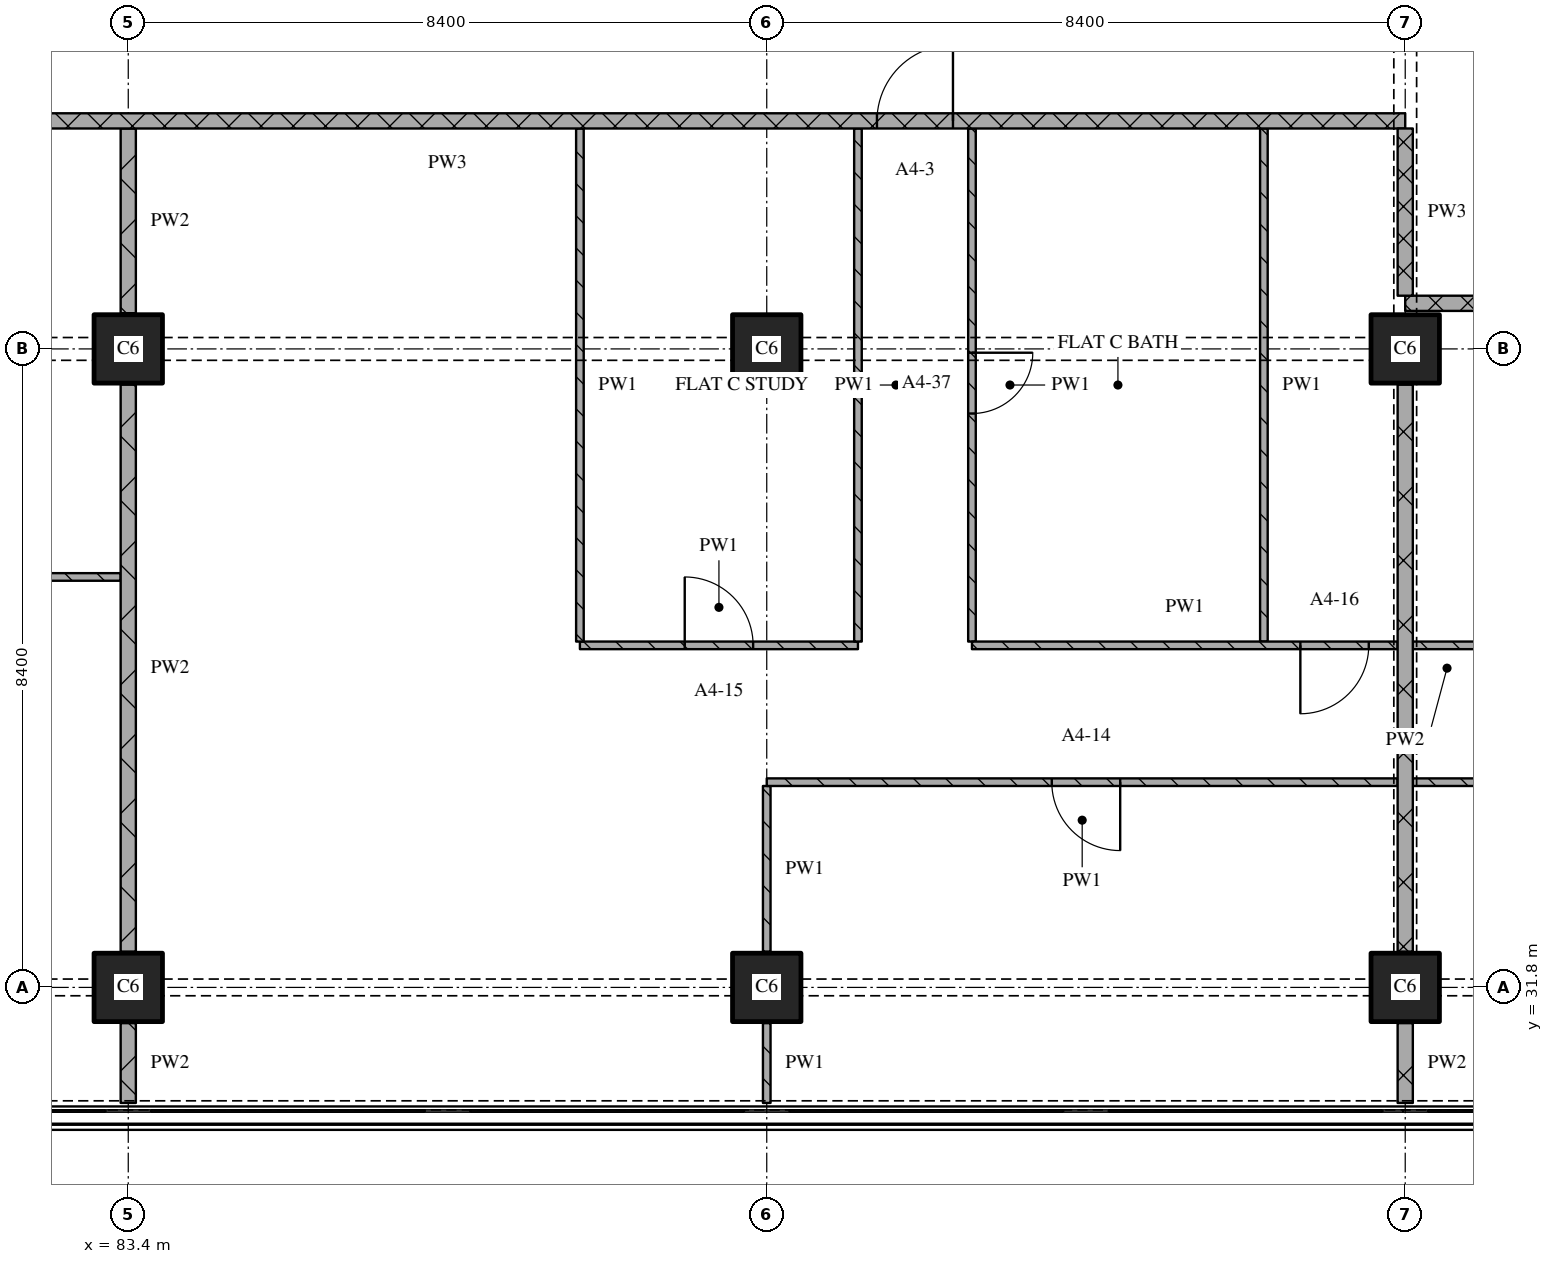
"""IFC4 building model, lengths in metres.
Left out: names, types, materials, properties, quantities, classifications, styles, units other than length and angle.
Written with IfcOpenShell. Run it as: python <this file> out.ifc"""

import sys

from ifc_helpers import new_model, si_unit, direction, frame, frame_2d, origin, origin_2d, place, context, subcontext, project, spatial, rectangle, extrude, element, fill, save


model = new_model("IFC4")
c1 = context("Model", 3, precision=1e-05, world=origin(), true_north=direction((0.0, 1.0)))
c2 = subcontext(c1, "Body", "Model", "MODEL_VIEW")
j1 = project(units=[si_unit("LENGTHUNIT", "METRE"), si_unit("PLANEANGLEUNIT", "RADIAN")], contexts=[c1])
p1 = place(None, origin())
s1 = spatial("IfcSite", under=j1, at=p1, CompositionType="ELEMENT")
p2 = place(p1, origin())
s2 = spatial("IfcBuilding", under=s1, at=p2, CompositionType="ELEMENT")
p3 = place(p2, frame((0.0, 0.0, 69.6)))
s3 = spatial("IfcBuildingStorey", under=s2, at=p3, CompositionType="ELEMENT", Elevation=69.6)
for number, where, z_axis, x_axis in (
    (1, (83.4, 31.8, 0.0), (0.0, 0.0, 1.0), (1.0, 0.0, 0.0)),
    (2, (83.4, 40.2, 0.0), (0.0, 0.0, 1.0), (1.0, 0.0, 0.0)),
    (3, (91.8, 31.8, 0.0), (0.0, 0.0, 1.0), (1.0, 0.0, 0.0)),
    (4, (91.8, 40.2, 0.0), (0.0, 0.0, 1.0), (1.0, 0.0, 0.0)),
    (5, (100.2, 31.8, 0.0), (0.0, 0.0, 1.0), (1.0, 0.0, 0.0)),
    (6, (100.2, 40.2, 0.0), (0.0, 0.0, 1.0), (1.0, 0.0, 0.0)),
):
    element("IfcColumn", number, at=place(p3, frame(where, z_axis=z_axis, x_axis=x_axis)), inside=s3, PredefinedType="COLUMN", context=c2, shape_type="SweptSolid", body=[
        extrude(rectangle(XDim=0.9, YDim=0.9, at=origin_2d()), origin(), (0.0, 0.0, 1.0), 3.6),
    ])
p4 = place(p3, frame((89.342, 36.3, 0.0), z_axis=(0.0, 0.0, 1.0), x_axis=(1.0, 0.0, 0.0)))
e7 = element("IfcWall", 7, at=p4, inside=s3, PredefinedType="PARTITIONING", context=c2, shape_type="SweptSolid", body=[
    extrude(rectangle(XDim=3.658, YDim=0.1, at=frame_2d((1.829, 0.0))), origin(), (0.0, 0.0, 1.0), 3.32),
])
p5 = place(p4, frame((1.379, 0.0, 0.0)))
e8 = element("IfcOpeningElement", 8, at=p5, cuts=e7, PredefinedType="OPENING", context=c2, shape_type="SweptSolid", body=[
    extrude(rectangle(XDim=0.9, YDim=2.1, at=frame_2d((0.45, 1.05))), frame((0.0, 0.06, 0.0), z_axis=(0.0, -1.0, 0.0), x_axis=(1.0, 0.0, 0.0)), (0.0, 0.0, 1.0), 0.12),
])
p6 = place(p3, frame((83.3, 37.2, 0.0), z_axis=(0.0, 0.0, 1.0), x_axis=(-1.0, 0.0, 0.0)))
e9 = element("IfcWall", 9, at=p6, inside=s3, PredefinedType="PARTITIONING", context=c2, shape_type="SweptSolid", body=[
    extrude(rectangle(XDim=4.1, YDim=0.1, at=frame_2d((2.05, 0.0))), origin(), (0.0, 0.0, 1.0), 3.32),
])
p7 = place(p6, frame((1.55, 0.0, 0.0)))
e10 = element("IfcOpeningElement", 10, at=p7, cuts=e9, PredefinedType="OPENING", context=c2, shape_type="SweptSolid", body=[
    extrude(rectangle(XDim=0.9, YDim=2.1, at=frame_2d((0.45, 1.05))), frame((0.0, 0.06, 0.0), z_axis=(0.0, -1.0, 0.0), x_axis=(1.0, 0.0, 0.0)), (0.0, 0.0, 1.0), 0.12),
])
p8 = place(p3, frame((124.28, 40.8, 0.0), z_axis=(0.0, 0.0, 1.0), x_axis=(-1.0, 0.0, 0.0)))
e11 = element("IfcWall", 11, at=p8, inside=s3, PredefinedType="PARTITIONING", context=c2, shape_type="SweptSolid", body=[
    extrude(rectangle(XDim=24.08, YDim=0.2, at=frame_2d((12.04, 0.0))), origin(), (0.0, 0.0, 1.0), 3.32),
])
p9 = place(p8, frame((12.03, 0.0, 0.0)))
e12 = element("IfcOpeningElement", 12, at=p9, cuts=e11, PredefinedType="OPENING", context=c2, shape_type="SweptSolid", body=[
    extrude(rectangle(XDim=1.0, YDim=2.1, at=frame_2d((0.5, 1.05))), frame((0.0, 0.11, 0.0), z_axis=(0.0, -1.0, 0.0), x_axis=(1.0, 0.0, 0.0)), (0.0, 0.0, 1.0), 0.22),
])
p10 = place(p3, frame((100.2, 43.2, 0.0), z_axis=(0.0, 0.0, 1.0), x_axis=(-1.0, 0.0, 0.0)))
e13 = element("IfcWall", 13, at=p10, inside=s3, PredefinedType="PARTITIONING", context=c2, shape_type="SweptSolid", body=[
    extrude(rectangle(XDim=25.2, YDim=0.2, at=frame_2d((12.6, 0.0))), origin(), (0.0, 0.0, 1.0), 3.32),
])
p11 = place(p10, frame((5.95, 0.0, 0.0)))
e14 = element("IfcOpeningElement", 14, at=p11, cuts=e13, PredefinedType="OPENING", context=c2, shape_type="SweptSolid", body=[
    extrude(rectangle(XDim=1.0, YDim=2.1, at=frame_2d((0.5, 1.05))), frame((0.0, 0.11, 0.0), z_axis=(0.0, -1.0, 0.0), x_axis=(1.0, 0.0, 0.0)), (0.0, 0.0, 1.0), 0.22),
])
p12 = place(p10, frame((21.25, 0.0, 0.0)))
e15 = element("IfcOpeningElement", 15, at=p12, cuts=e13, PredefinedType="OPENING", context=c2, shape_type="SweptSolid", body=[
    extrude(rectangle(XDim=1.0, YDim=2.1, at=frame_2d((0.5, 1.05))), frame((0.0, 0.11, 0.0), z_axis=(0.0, -1.0, 0.0), x_axis=(1.0, 0.0, 0.0)), (0.0, 0.0, 1.0), 0.22),
])
p13 = place(p3, frame((83.4, 31.33, 0.0), z_axis=(0.0, 0.0, 1.0), x_axis=(0.0, -1.0, 0.0)))
e16 = element("IfcWall", 16, at=p13, inside=s3, PredefinedType="PARTITIONING", context=c2, shape_type="SweptSolid", body=[
    extrude(rectangle(XDim=1.05, YDim=0.2, at=frame_2d((0.525, 0.0))), origin(), (0.0, 0.0, 1.0), 3.32),
])
p14 = place(p3, frame((83.4, 39.73, 0.0), z_axis=(0.0, 0.0, 1.0), x_axis=(0.0, -1.0, 0.0)))
e17 = element("IfcWall", 17, at=p14, inside=s3, PredefinedType="PARTITIONING", context=c2, shape_type="SweptSolid", body=[
    extrude(rectangle(XDim=7.46, YDim=0.2, at=frame_2d((3.73, 0.0))), origin(), (0.0, 0.0, 1.0), 3.32),
])
p15 = place(p3, frame((83.4, 43.1, 0.0), z_axis=(0.0, 0.0, 1.0), x_axis=(0.0, -1.0, 0.0)))
e18 = element("IfcWall", 18, at=p15, inside=s3, PredefinedType="PARTITIONING", context=c2, shape_type="SweptSolid", body=[
    extrude(rectangle(XDim=2.43, YDim=0.2, at=frame_2d((1.215, 0.0))), origin(), (0.0, 0.0, 1.0), 3.32),
])
p16 = place(p3, frame((89.342, 43.1, 0.0), z_axis=(0.0, 0.0, 1.0), x_axis=(0.0, -1.0, 0.0)))
e19 = element("IfcWall", 19, at=p16, inside=s3, PredefinedType="PARTITIONING", context=c2, shape_type="SweptSolid", body=[
    extrude(rectangle(XDim=6.75, YDim=0.1, at=frame_2d((3.375, 0.0))), origin(), (0.0, 0.0, 1.0), 3.32),
])
p17 = place(p3, frame((91.8, 31.33, 0.0), z_axis=(0.0, 0.0, 1.0), x_axis=(0.0, -1.0, 0.0)))
e20 = element("IfcWall", 20, at=p17, inside=s3, PredefinedType="PARTITIONING", context=c2, shape_type="SweptSolid", body=[
    extrude(rectangle(XDim=1.05, YDim=0.1, at=frame_2d((0.525, 0.0))), origin(), (0.0, 0.0, 1.0), 3.32),
])
p18 = place(p3, frame((91.8, 34.45, 0.0), z_axis=(0.0, 0.0, 1.0), x_axis=(0.0, -1.0, 0.0)))
e21 = element("IfcWall", 21, at=p18, inside=s3, PredefinedType="PARTITIONING", context=c2, shape_type="SweptSolid", body=[
    extrude(rectangle(XDim=2.18, YDim=0.1, at=frame_2d((1.09, 0.0))), origin(), (0.0, 0.0, 1.0), 3.32),
])
p19 = place(p3, frame((93.0, 43.1, 0.0), z_axis=(0.0, 0.0, 1.0), x_axis=(0.0, -1.0, 0.0)))
e22 = element("IfcWall", 22, at=p19, inside=s3, PredefinedType="PARTITIONING", context=c2, shape_type="SweptSolid", body=[
    extrude(rectangle(XDim=6.75, YDim=0.1, at=frame_2d((3.375, 0.0))), origin(), (0.0, 0.0, 1.0), 3.32),
])
p20 = place(p3, frame((94.5, 43.1, 0.0), z_axis=(0.0, 0.0, 1.0), x_axis=(0.0, -1.0, 0.0)))
e23 = element("IfcWall", 23, at=p20, inside=s3, PredefinedType="PARTITIONING", context=c2, shape_type="SweptSolid", body=[
    extrude(rectangle(XDim=6.75, YDim=0.1, at=frame_2d((3.375, 0.0))), origin(), (0.0, 0.0, 1.0), 3.32),
])
p21 = place(p20, frame((2.95, 0.0, 0.0)))
e24 = element("IfcOpeningElement", 24, at=p21, cuts=e23, PredefinedType="OPENING", context=c2, shape_type="SweptSolid", body=[
    extrude(rectangle(XDim=0.8, YDim=2.1, at=frame_2d((0.4, 1.05))), frame((0.0, 0.06, 0.0), z_axis=(0.0, -1.0, 0.0), x_axis=(1.0, 0.0, 0.0)), (0.0, 0.0, 1.0), 0.12),
])
p22 = place(p3, frame((98.341, 43.1, 0.0), z_axis=(0.0, 0.0, 1.0), x_axis=(0.0, -1.0, 0.0)))
e25 = element("IfcWall", 25, at=p22, inside=s3, PredefinedType="PARTITIONING", context=c2, shape_type="SweptSolid", body=[
    extrude(rectangle(XDim=6.75, YDim=0.1, at=frame_2d((3.375, 0.0))), origin(), (0.0, 0.0, 1.0), 3.32),
])
p23 = place(p3, frame((100.2, 43.1, 0.0), z_axis=(0.0, 0.0, 1.0), x_axis=(0.0, -1.0, 0.0)))
e26 = element("IfcWall", 26, at=p23, inside=s3, PredefinedType="PARTITIONING", context=c2, shape_type="SweptSolid", body=[
    extrude(rectangle(XDim=2.2, YDim=0.2, at=frame_2d((1.1, 0.0))), origin(), (0.0, 0.0, 1.0), 2.43),
])
p24 = place(p3, frame((100.2, 31.33, 0.0), z_axis=(0.0, 0.0, 1.0), x_axis=(0.0, -1.0, 0.0)))
e27 = element("IfcWall", 27, at=p24, inside=s3, PredefinedType="PARTITIONING", context=c2, shape_type="SweptSolid", body=[
    extrude(rectangle(XDim=1.05, YDim=0.2, at=frame_2d((0.525, 0.0))), origin(), (0.0, 0.0, 1.0), 3.32),
])
p25 = place(p3, frame((100.2, 39.73, 0.0), z_axis=(0.0, 0.0, 1.0), x_axis=(0.0, -1.0, 0.0)))
e28 = element("IfcWall", 28, at=p25, inside=s3, PredefinedType="PARTITIONING", context=c2, shape_type="SweptSolid", body=[
    extrude(rectangle(XDim=7.46, YDim=0.2, at=frame_2d((3.73, 0.0))), origin(), (0.0, 0.0, 1.0), 2.83),
])
p26 = place(p3, frame((100.1, 34.5, 0.0), z_axis=(0.0, 0.0, 1.0), x_axis=(-1.0, 0.0, 0.0)))
e29 = element("IfcWall", 29, at=p26, inside=s3, PredefinedType="PARTITIONING", context=c2, shape_type="SweptSolid", body=[
    extrude(rectangle(XDim=8.3, YDim=0.1, at=frame_2d((4.15, 0.0))), origin(), (0.0, 0.0, 1.0), 3.32),
])
p27 = place(p26, frame((3.65, 0.0, 0.0)))
e30 = element("IfcOpeningElement", 30, at=p27, cuts=e29, PredefinedType="OPENING", context=c2, shape_type="SweptSolid", body=[
    extrude(rectangle(XDim=0.9, YDim=2.1, at=frame_2d((0.45, 1.05))), frame((0.0, 0.06, 0.0), z_axis=(0.0, -1.0, 0.0), x_axis=(1.0, 0.0, 0.0)), (0.0, 0.0, 1.0), 0.12),
])
p28 = place(p3, frame((117.0, 34.5, 0.0), z_axis=(0.0, 0.0, 1.0), x_axis=(-1.0, 0.0, 0.0)))
e31 = element("IfcWall", 31, at=p28, inside=s3, PredefinedType="PARTITIONING", context=c2, shape_type="SweptSolid", body=[
    extrude(rectangle(XDim=16.7, YDim=0.1, at=frame_2d((8.35, 0.0))), origin(), (0.0, 0.0, 1.0), 3.32),
])
p29 = place(p28, frame((7.95, 0.0, 0.0)))
e32 = element("IfcOpeningElement", 32, at=p29, cuts=e31, PredefinedType="OPENING", context=c2, shape_type="SweptSolid", body=[
    extrude(rectangle(XDim=0.9, YDim=2.1, at=frame_2d((0.45, 1.05))), frame((0.0, 0.06, 0.0), z_axis=(0.0, -1.0, 0.0), x_axis=(1.0, 0.0, 0.0)), (0.0, 0.0, 1.0), 0.12),
])
p30 = place(p28, frame((14.25, 0.0, 0.0)))
e33 = element("IfcOpeningElement", 33, at=p30, cuts=e31, PredefinedType="OPENING", context=c2, shape_type="SweptSolid", body=[
    extrude(rectangle(XDim=0.9, YDim=2.1, at=frame_2d((0.45, 1.05))), frame((0.0, 0.06, 0.0), z_axis=(0.0, -1.0, 0.0), x_axis=(1.0, 0.0, 0.0)), (0.0, 0.0, 1.0), 0.12),
])
p31 = place(p3, frame((94.5, 36.3, 0.0), z_axis=(0.0, 0.0, 1.0), x_axis=(1.0, 0.0, 0.0)))
e34 = element("IfcWall", 34, at=p31, inside=s3, PredefinedType="PARTITIONING", context=c2, shape_type="SweptSolid", body=[
    extrude(rectangle(XDim=5.6, YDim=0.1, at=frame_2d((2.8, 0.0))), origin(), (0.0, 0.0, 1.0), 3.32),
])
p32 = place(p31, frame((4.32, 0.0, 0.0)))
e35 = element("IfcOpeningElement", 35, at=p32, cuts=e34, PredefinedType="OPENING", context=c2, shape_type="SweptSolid", body=[
    extrude(rectangle(XDim=0.9, YDim=2.1, at=frame_2d((0.45, 1.05))), frame((0.0, 0.06, 0.0), z_axis=(0.0, -1.0, 0.0), x_axis=(1.0, 0.0, 0.0)), (0.0, 0.0, 1.0), 0.12),
])
p33 = place(p3, frame((100.3, 36.3, 0.0), z_axis=(0.0, 0.0, 1.0), x_axis=(1.0, 0.0, 0.0)))
e36 = element("IfcWall", 36, at=p33, inside=s3, PredefinedType="PARTITIONING", context=c2, shape_type="SweptSolid", body=[
    extrude(rectangle(XDim=10.7, YDim=0.1, at=frame_2d((5.35, 0.0))), origin(), (0.0, 0.0, 1.0), 3.32),
])
p34 = place(p33, frame((1.75, 0.0, 0.0)))
e37 = element("IfcOpeningElement", 37, at=p34, cuts=e36, PredefinedType="OPENING", context=c2, shape_type="SweptSolid", body=[
    extrude(rectangle(XDim=0.8, YDim=2.1, at=frame_2d((0.4, 1.05))), frame((0.0, 0.06, 0.0), z_axis=(0.0, -1.0, 0.0), x_axis=(1.0, 0.0, 0.0)), (0.0, 0.0, 1.0), 0.12),
])
p35 = place(p33, frame((6.25, 0.0, 0.0)))
e38 = element("IfcOpeningElement", 38, at=p35, cuts=e36, PredefinedType="OPENING", context=c2, shape_type="SweptSolid", body=[
    extrude(rectangle(XDim=0.8, YDim=2.1, at=frame_2d((0.4, 1.05))), frame((0.0, 0.06, 0.0), z_axis=(0.0, -1.0, 0.0), x_axis=(1.0, 0.0, 0.0)), (0.0, 0.0, 1.0), 0.12),
])
p36 = place(p5, origin())
e39 = element("IfcDoor", 39, at=p36, inside=s3, OperationType="SINGLE_SWING_LEFT", PredefinedType="DOOR", context=c2, shape_type="SweptSolid", body=[
    extrude(rectangle(XDim=0.9, YDim=2.1, at=frame_2d((0.45, 1.05))), frame((0.0, 0.025, 0.0), z_axis=(0.0, -1.0, 0.0), x_axis=(1.0, 0.0, 0.0)), (0.0, 0.0, 1.0), 0.05),
])
fill(e8, e39)
p37 = place(p11, origin())
e40 = element("IfcDoor", 40, at=p37, inside=s3, OperationType="SINGLE_SWING_RIGHT", PredefinedType="DOOR", context=c2, shape_type="SweptSolid", body=[
    extrude(rectangle(XDim=1.0, YDim=2.1, at=frame_2d((0.5, 1.05))), frame((0.0, 0.025, 0.0), z_axis=(0.0, -1.0, 0.0), x_axis=(1.0, 0.0, 0.0)), (0.0, 0.0, 1.0), 0.05),
])
fill(e14, e40)
p38 = place(p21, origin())
e41 = element("IfcDoor", 41, at=p38, inside=s3, OperationType="SINGLE_SWING_LEFT", PredefinedType="DOOR", context=c2, shape_type="SweptSolid", body=[
    extrude(rectangle(XDim=0.8, YDim=2.1, at=frame_2d((0.4, 1.05))), frame((0.0, 0.025, 0.0), z_axis=(0.0, -1.0, 0.0), x_axis=(1.0, 0.0, 0.0)), (0.0, 0.0, 1.0), 0.05),
])
fill(e24, e41)
p39 = place(p27, origin())
e42 = element("IfcDoor", 42, at=p39, inside=s3, OperationType="SINGLE_SWING_LEFT", PredefinedType="DOOR", context=c2, shape_type="SweptSolid", body=[
    extrude(rectangle(XDim=0.9, YDim=2.1, at=frame_2d((0.45, 1.05))), frame((0.0, 0.025, 0.0), z_axis=(0.0, -1.0, 0.0), x_axis=(1.0, 0.0, 0.0)), (0.0, 0.0, 1.0), 0.05),
])
fill(e30, e42)
p40 = place(p32, origin())
e43 = element("IfcDoor", 43, at=p40, inside=s3, OperationType="SINGLE_SWING_RIGHT", PredefinedType="DOOR", context=c2, shape_type="SweptSolid", body=[
    extrude(rectangle(XDim=0.9, YDim=2.1, at=frame_2d((0.45, 1.05))), frame((0.0, 0.025, 0.0), z_axis=(0.0, -1.0, 0.0), x_axis=(1.0, 0.0, 0.0)), (0.0, 0.0, 1.0), 0.05),
])
fill(e35, e43)
save(model, sys.argv[1])
